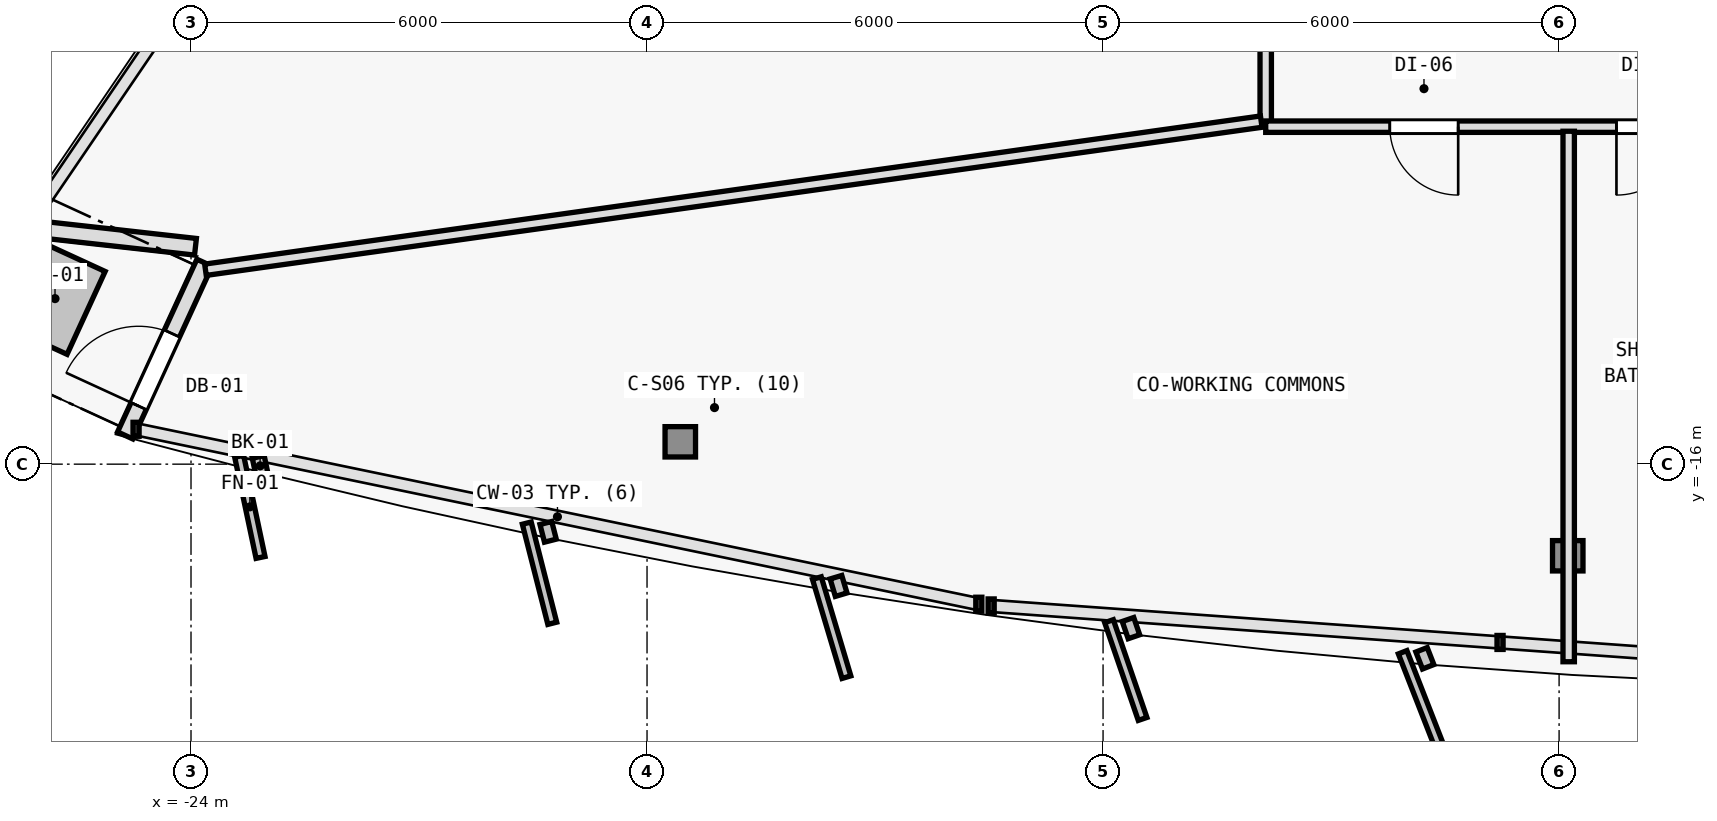
"""IFC4 building model, lengths in metres.
Left out: names, types, materials, properties, quantities, classifications, styles, units other than length and angle.
Written with IfcOpenShell. Run it as: python <this file> out.ifc"""

import sys

from ifc_helpers import new_model, si_unit, direction, frame, frame_2d, origin, origin_2d, place, context, subcontext, project, spatial, rectangle, i_section, extrude, element, fill, save


model = new_model("IFC4")
c1 = context("Model", 3, precision=1e-05, world=origin(), true_north=direction((0.0, 1.0)))
c2 = subcontext(c1, "Body", "Model", "MODEL_VIEW")
j1 = project(units=[si_unit("LENGTHUNIT", "METRE"), si_unit("PLANEANGLEUNIT", "RADIAN")], contexts=[c1])
p1 = place(None, origin())
s1 = spatial("IfcSite", under=j1, at=p1, CompositionType="ELEMENT")
p2 = place(p1, origin())
s2 = spatial("IfcBuilding", under=s1, at=p2, CompositionType="ELEMENT")
p3 = place(p2, frame((0.0, 0.0, 167.4)))
s3 = spatial("IfcBuildingStorey", under=s2, at=p3, CompositionType="ELEMENT", Elevation=167.4)
p4 = place(p3, frame((-17.562, -15.706, 0.006), z_axis=(0.020596292833, 0.033511459955, 0.999226087917), x_axis=(-0.851954850327, 0.523615252838, 0.0)))
e1 = element("IfcColumn", 1, at=p4, inside=s3, PredefinedType="COLUMN", context=c2, shape_type="SweptSolid", body=[
    extrude(i_section(OverallWidth=0.401, OverallDepth=0.399, WebThickness=0.016, FlangeThickness=0.025, FilletRadius=0.015, at=origin_2d()), origin(), (0.0, 0.0, 1.0), 3.592),
])
p5 = place(p3, frame((-5.886, -17.205, 0.006), z_axis=(0.006866324617, 0.035215407439, 0.999356157066), x_axis=(-0.981516643497, 0.191376797284, 0.0)))
e2 = element("IfcColumn", 2, at=p5, inside=s3, PredefinedType="COLUMN", context=c2, shape_type="SweptSolid", body=[
    extrude(i_section(OverallWidth=0.401, OverallDepth=0.399, WebThickness=0.016, FlangeThickness=0.025, FilletRadius=0.015, at=origin_2d()), origin(), (0.0, 0.0, 1.0), 3.591),
])
p6 = place(p3, frame((-23.941, -13.14, 0.0), z_axis=(0.0, 0.0, 1.0), x_axis=(-0.993825249999, 0.110956624245, 0.0)))
e3 = element("IfcWall", 3, at=p6, inside=s3, PredefinedType="SOLIDWALL", context=c2, shape_type="SweptSolid", body=[
    extrude(rectangle(XDim=2.398, YDim=0.22, at=frame_2d((1.199, 0.0))), origin(), (0.0, 0.0, 1.0), 3.35),
])
p7 = place(p3, frame((-24.866, -15.622, 0.0), z_axis=(0.0, 0.0, 1.0), x_axis=(0.417478378529, 0.908686856657, 0.0)))
e4 = element("IfcWall", 4, at=p7, inside=s3, PredefinedType="SOLIDWALL", context=c2, shape_type="SweptSolid", body=[
    extrude(rectangle(XDim=2.5, YDim=0.22, at=frame_2d((1.25, 0.0))), origin(), (0.0, 0.0, 1.0), 3.35),
])
p8 = place(p7, frame((0.425, 0.0, 0.0)))
e5 = element("IfcOpeningElement", 5, at=p8, cuts=e4, PredefinedType="OPENING", context=c2, shape_type="SweptSolid", body=[
    extrude(rectangle(XDim=1.05, YDim=2.15, at=frame_2d((0.525, 1.075))), frame((0.0, 0.12, 0.0), z_axis=(0.0, -1.0, 0.0), x_axis=(1.0, 0.0, 0.0)), (0.0, 0.0, 1.0), 0.24),
])
p9 = place(p3, frame((-9.86, -11.56, 0.0), z_axis=(0.0, 0.0, 1.0), x_axis=(0.0, 1.0, 0.0)))
e6 = element("IfcWall", 6, at=p9, inside=s3, PredefinedType="PARTITIONING", context=c2, shape_type="SweptSolid", body=[
    extrude(rectangle(XDim=19.986, YDim=0.15, at=frame_2d((9.993, 0.0))), origin(), (0.0, 0.0, 1.0), 2.775),
])
p10 = place(p9, frame((8.395, 0.0, 0.0)))
e7 = element("IfcOpeningElement", 7, at=p10, cuts=e6, PredefinedType="OPENING", context=c2, shape_type="SweptSolid", body=[
    extrude(rectangle(XDim=0.9, YDim=2.1, at=frame_2d((0.45, 1.05))), frame((0.0, 0.085, 0.0), z_axis=(0.0, -1.0, 0.0), x_axis=(1.0, 0.0, 0.0)), (0.0, 0.0, 1.0), 0.17),
])
p11 = place(p9, frame((5.685, 0.0, 0.0)))
e8 = element("IfcOpeningElement", 8, at=p11, cuts=e6, PredefinedType="OPENING", context=c2, shape_type="SweptSolid", body=[
    extrude(rectangle(XDim=0.9, YDim=2.1, at=frame_2d((0.45, 1.05))), frame((0.0, 0.085, 0.0), z_axis=(0.0, -1.0, 0.0), x_axis=(1.0, 0.0, 0.0)), (0.0, 0.0, 1.0), 0.17),
])
p12 = place(p9, frame((1.97, 0.0, 0.0)))
e9 = element("IfcOpeningElement", 9, at=p12, cuts=e6, PredefinedType="OPENING", context=c2, shape_type="SweptSolid", body=[
    extrude(rectangle(XDim=0.9, YDim=2.1, at=frame_2d((0.45, 1.05))), frame((0.0, 0.085, 0.0), z_axis=(0.0, -1.0, 0.0), x_axis=(1.0, 0.0, 0.0)), (0.0, 0.0, 1.0), 0.17),
])
p13 = place(p9, frame((16.972, 0.0, 0.0)))
e10 = element("IfcOpeningElement", 10, at=p13, cuts=e6, PredefinedType="OPENING", context=c2, shape_type="SweptSolid", body=[
    extrude(rectangle(XDim=0.9, YDim=2.1, at=frame_2d((0.45, 1.05))), frame((0.0, 0.085, 0.0), z_axis=(0.0, -1.0, 0.0), x_axis=(1.0, 0.0, 0.0)), (0.0, 0.0, 1.0), 0.17),
])
p14 = place(p9, frame((12.11, 0.0, 0.0)))
e11 = element("IfcOpeningElement", 11, at=p14, cuts=e6, PredefinedType="OPENING", context=c2, shape_type="SweptSolid", body=[
    extrude(rectangle(XDim=0.9, YDim=2.1, at=frame_2d((0.45, 1.05))), frame((0.0, 0.085, 0.0), z_axis=(0.0, -1.0, 0.0), x_axis=(1.0, 0.0, 0.0)), (0.0, 0.0, 1.0), 0.17),
])
p15 = place(p3, frame((13.18, -11.56, 0.0), z_axis=(0.0, 0.0, 1.0), x_axis=(-1.0, 0.0, 0.0)))
e12 = element("IfcWall", 12, at=p15, inside=s3, PredefinedType="PARTITIONING", context=c2, shape_type="SweptSolid", body=[
    extrude(rectangle(XDim=23.04, YDim=0.15, at=frame_2d((11.52, 0.0))), origin(), (0.0, 0.0, 1.0), 2.775),
])
p16 = place(p15, frame((20.508, 0.0, 0.0)))
e13 = element("IfcOpeningElement", 13, at=p16, cuts=e12, PredefinedType="OPENING", context=c2, shape_type="SweptSolid", body=[
    extrude(rectangle(XDim=0.9, YDim=2.1, at=frame_2d((0.45, 1.05))), frame((0.0, 0.085, 0.0), z_axis=(0.0, -1.0, 0.0), x_axis=(1.0, 0.0, 0.0)), (0.0, 0.0, 1.0), 0.17),
])
p17 = place(p15, frame((17.525, 0.0, 0.0)))
e14 = element("IfcOpeningElement", 14, at=p17, cuts=e12, PredefinedType="OPENING", context=c2, shape_type="SweptSolid", body=[
    extrude(rectangle(XDim=0.9, YDim=2.1, at=frame_2d((0.45, 1.05))), frame((0.0, 0.085, 0.0), z_axis=(0.0, -1.0, 0.0), x_axis=(1.0, 0.0, 0.0)), (0.0, 0.0, 1.0), 0.17),
])
p18 = place(p15, frame((14.848, 0.0, 0.0)))
e15 = element("IfcOpeningElement", 15, at=p18, cuts=e12, PredefinedType="OPENING", context=c2, shape_type="SweptSolid", body=[
    extrude(rectangle(XDim=0.9, YDim=2.1, at=frame_2d((0.45, 1.05))), frame((0.0, 0.085, 0.0), z_axis=(0.0, -1.0, 0.0), x_axis=(1.0, 0.0, 0.0)), (0.0, 0.0, 1.0), 0.17),
])
p19 = place(p15, frame((11.422, 0.0, 0.0)))
e16 = element("IfcOpeningElement", 16, at=p19, cuts=e12, PredefinedType="OPENING", context=c2, shape_type="SweptSolid", body=[
    extrude(rectangle(XDim=0.9, YDim=2.1, at=frame_2d((0.45, 1.05))), frame((0.0, 0.085, 0.0), z_axis=(0.0, -1.0, 0.0), x_axis=(1.0, 0.0, 0.0)), (0.0, 0.0, 1.0), 0.17),
])
p20 = place(p15, frame((8.225, 0.0, 0.0)))
e17 = element("IfcOpeningElement", 17, at=p20, cuts=e12, PredefinedType="OPENING", context=c2, shape_type="SweptSolid", body=[
    extrude(rectangle(XDim=0.9, YDim=2.1, at=frame_2d((0.45, 1.05))), frame((0.0, 0.085, 0.0), z_axis=(0.0, -1.0, 0.0), x_axis=(1.0, 0.0, 0.0)), (0.0, 0.0, 1.0), 0.17),
])
p21 = place(p15, frame((5.729, 0.0, 0.0)))
e18 = element("IfcOpeningElement", 18, at=p21, cuts=e12, PredefinedType="OPENING", context=c2, shape_type="SweptSolid", body=[
    extrude(rectangle(XDim=0.9, YDim=2.1, at=frame_2d((0.45, 1.05))), frame((0.0, 0.085, 0.0), z_axis=(0.0, -1.0, 0.0), x_axis=(1.0, 0.0, 0.0)), (0.0, 0.0, 1.0), 0.17),
])
p22 = place(p15, frame((2.955, 0.0, 0.0)))
e19 = element("IfcOpeningElement", 19, at=p22, cuts=e12, PredefinedType="OPENING", context=c2, shape_type="SweptSolid", body=[
    extrude(rectangle(XDim=0.9, YDim=2.1, at=frame_2d((0.45, 1.05))), frame((0.0, 0.085, 0.0), z_axis=(0.0, -1.0, 0.0), x_axis=(1.0, 0.0, 0.0)), (0.0, 0.0, 1.0), 0.17),
])
p23 = place(p15, frame((0.478, 0.0, 0.0)))
e20 = element("IfcOpeningElement", 20, at=p23, cuts=e12, PredefinedType="OPENING", context=c2, shape_type="SweptSolid", body=[
    extrude(rectangle(XDim=0.85, YDim=2.1, at=frame_2d((0.425, 1.05))), frame((0.0, 0.085, 0.0), z_axis=(0.0, -1.0, 0.0), x_axis=(1.0, 0.0, 0.0)), (0.0, 0.0, 1.0), 0.17),
])
p24 = place(p3, frame((-5.874, -11.62, 0.0), z_axis=(0.0, 0.0, 1.0), x_axis=(0.0, -1.0, 0.0)))
e21 = element("IfcWall", 21, at=p24, inside=s3, PredefinedType="PARTITIONING", context=c2, shape_type="SweptSolid", body=[
    extrude(rectangle(XDim=6.979, YDim=0.15, at=frame_2d((3.49, 0.0))), origin(), (0.0, 0.0, 1.0), 2.725),
])
p25 = place(p3, frame((-9.919, -11.494, 0.0), z_axis=(0.0, 0.0, 1.0), x_axis=(-0.990302465123, -0.138928138155, 0.0)))
e22 = element("IfcWall", 22, at=p25, inside=s3, PredefinedType="PARTITIONING", context=c2, shape_type="SweptSolid", body=[
    extrude(rectangle(XDim=14.027, YDim=0.15, at=frame_2d((7.013, 0.0))), origin(), (0.0, 0.0, 1.0), 2.775),
])
p26 = place(p8, origin())
e23 = element("IfcDoor", 23, at=p26, inside=s3, OperationType="SINGLE_SWING_LEFT", PredefinedType="DOOR", context=c2, shape_type="SweptSolid", body=[
    extrude(rectangle(XDim=1.05, YDim=2.15, at=frame_2d((0.525, 1.075))), frame((0.0, 0.025, 0.0), z_axis=(0.0, -1.0, 0.0), x_axis=(1.0, 0.0, 0.0)), (0.0, 0.0, 1.0), 0.05),
])
fill(e5, e23)
p27 = place(p16, origin())
e24 = element("IfcDoor", 24, at=p27, inside=s3, OperationType="SINGLE_SWING_LEFT", PredefinedType="DOOR", context=c2, shape_type="SweptSolid", body=[
    extrude(rectangle(XDim=0.9, YDim=2.1, at=frame_2d((0.45, 1.05))), frame((0.0, 0.025, 0.0), z_axis=(0.0, -1.0, 0.0), x_axis=(1.0, 0.0, 0.0)), (0.0, 0.0, 1.0), 0.05),
])
fill(e13, e24)
p28 = place(p17, origin())
e25 = element("IfcDoor", 25, at=p28, inside=s3, OperationType="SINGLE_SWING_RIGHT", PredefinedType="DOOR", context=c2, shape_type="SweptSolid", body=[
    extrude(rectangle(XDim=0.9, YDim=2.1, at=frame_2d((0.45, 1.05))), frame((0.0, 0.025, 0.0), z_axis=(0.0, -1.0, 0.0), x_axis=(1.0, 0.0, 0.0)), (0.0, 0.0, 1.0), 0.05),
])
fill(e14, e25)
save(model, sys.argv[1])
